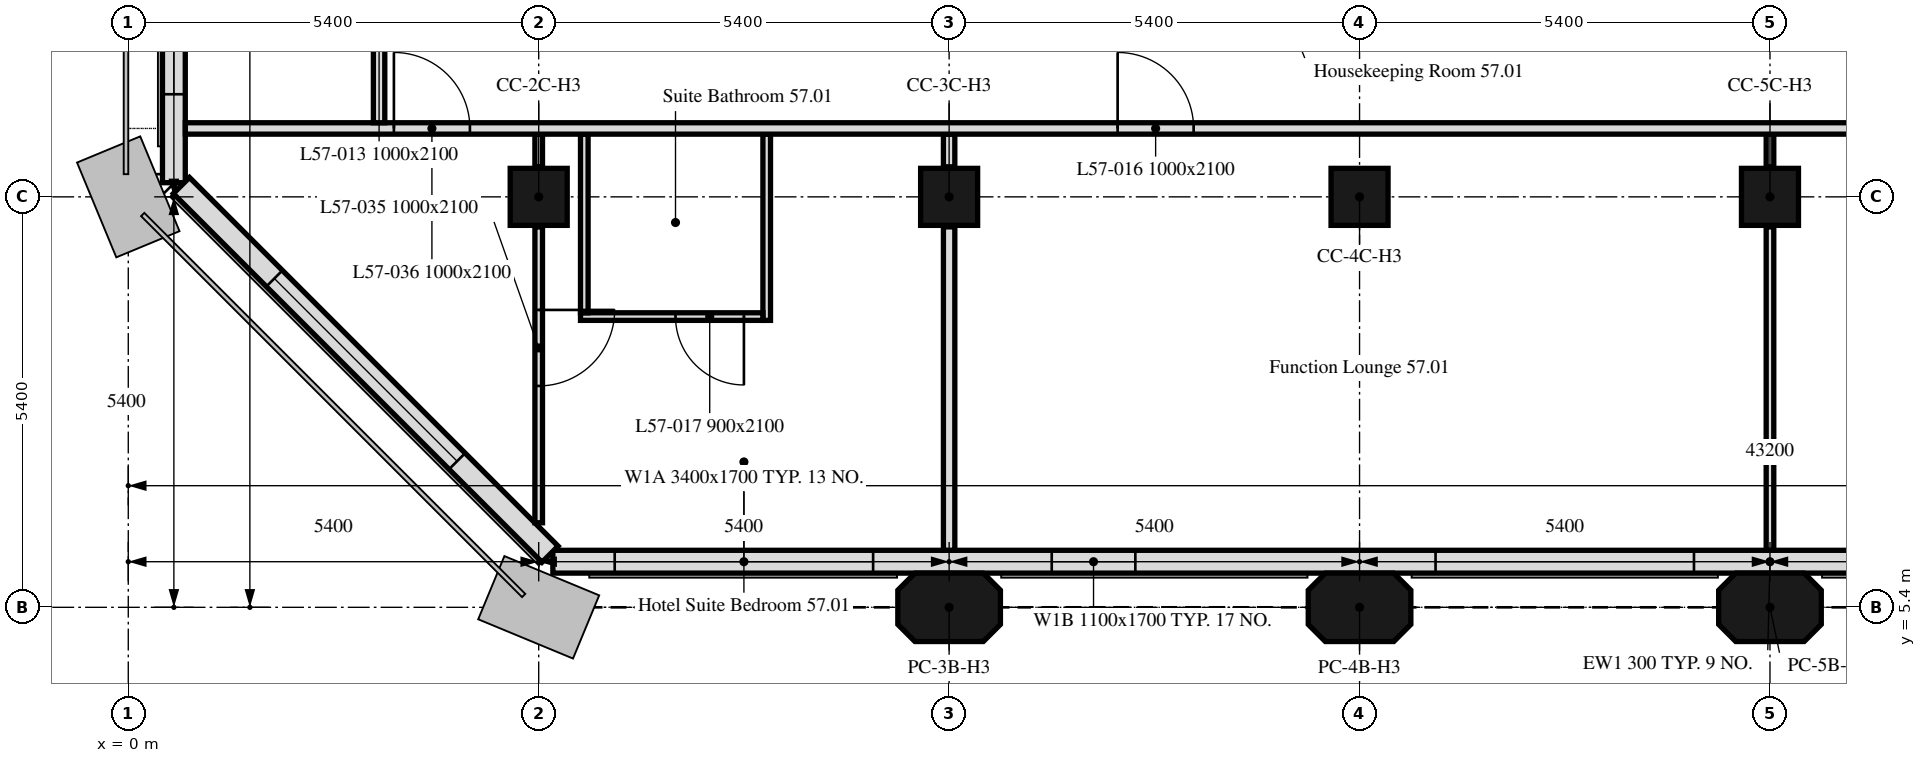
"""IFC4 building model, lengths in metres.
Left out: names, types, materials, properties, quantities, classifications, styles, units other than length and angle.
Written with IfcOpenShell. Run it as: python <this file> out.ifc"""

import sys

from ifc_helpers import new_model, si_unit, direction, frame, frame_2d, origin, origin_2d, place, context, subcontext, project, spatial, polyline, rectangle, outline, extrude, element, fill, save


model = new_model("IFC4")
c1 = context("Model", 3, precision=1e-05, world=origin(), true_north=direction((0.0, 1.0)))
c2 = subcontext(c1, "Body", "Model", "MODEL_VIEW")
j1 = project(units=[si_unit("LENGTHUNIT", "METRE"), si_unit("PLANEANGLEUNIT", "RADIAN")], contexts=[c1])
p1 = place(None, origin())
s1 = spatial("IfcSite", under=j1, at=p1, CompositionType="ELEMENT")
p2 = place(p1, origin())
s2 = spatial("IfcBuilding", under=s1, at=p2, CompositionType="ELEMENT")
p3 = place(p2, frame((0.0, 0.0, 226.9)))
s3 = spatial("IfcBuildingStorey", under=s2, at=p3, CompositionType="ELEMENT", Elevation=226.9)
for number, where, z_axis, x_axis in (
    (1, (10.8, 5.4, 0.0), (0.0, 0.0, 1.0), (1.0, 0.0, 0.0)),
    (2, (16.2, 5.4, 0.0), (0.0, 0.0, 1.0), (1.0, 0.0, 0.0)),
    (3, (21.6, 5.4, 0.0), (0.0, 0.0, 1.0), (1.0, 0.0, 0.0)),
):
    element("IfcColumn", number, at=place(p3, frame(where, z_axis=z_axis, x_axis=x_axis)), inside=s3, PredefinedType="COLUMN", context=c2, shape_type="SweptSolid", body=[
        extrude(outline(polyline([(-0.45, -0.45), (0.45, -0.45), (0.675, -0.225), (0.675, 0.225), (0.45, 0.45), (-0.45, 0.45), (-0.675, 0.225), (-0.675, -0.225), (-0.45, -0.45)])), origin(), (0.0, 0.0, 1.0), 3.0),
    ])
for number, where, z_axis, x_axis in (
    (4, (5.4, 10.8, 0.0), (0.0, 0.0, 1.0), (1.0, 0.0, 0.0)),
    (5, (10.8, 10.8, 0.0), (0.0, 0.0, 1.0), (1.0, 0.0, 0.0)),
    (6, (16.2, 10.8, 0.0), (0.0, 0.0, 1.0), (1.0, 0.0, 0.0)),
    (7, (21.6, 10.8, 0.0), (0.0, 0.0, 1.0), (1.0, 0.0, 0.0)),
):
    element("IfcColumn", number, at=place(p3, frame(where, z_axis=z_axis, x_axis=x_axis)), inside=s3, PredefinedType="COLUMN", context=c2, shape_type="SweptSolid", body=[
        extrude(rectangle(XDim=0.75, YDim=0.75, at=origin_2d()), origin(), (0.0, 0.0, 1.0), 3.0),
    ])
p4 = place(p3, frame((5.586, 6.0, 0.0), z_axis=(0.0, 0.0, 1.0), x_axis=(1.0, 0.0, 0.0)))
e8 = element("IfcWall", 8, at=p4, inside=s3, PredefinedType="SOLIDWALL", context=c2, shape_type="SweptSolid", body=[
    extrude(rectangle(XDim=32.027, YDim=0.3, at=frame_2d((16.014, 0.0))), origin(), (0.0, 0.0, 1.0), 3.0),
])
p5 = place(p4, frame((0.814, 0.0, 0.9)))
e9 = element("IfcOpeningElement", 9, at=p5, cuts=e8, PredefinedType="OPENING", context=c2, shape_type="SweptSolid", body=[
    extrude(rectangle(XDim=3.4, YDim=1.7, at=frame_2d((1.7, 0.85))), frame((0.0, 0.16, 0.0), z_axis=(0.0, -1.0, 0.0), x_axis=(1.0, 0.0, 0.0)), (0.0, 0.0, 1.0), 0.32),
])
p6 = place(p4, frame((6.564, 0.0, 0.9)))
e10 = element("IfcOpeningElement", 10, at=p6, cuts=e8, PredefinedType="OPENING", context=c2, shape_type="SweptSolid", body=[
    extrude(rectangle(XDim=1.1, YDim=1.7, at=frame_2d((0.55, 0.85))), frame((0.0, 0.16, 0.0), z_axis=(0.0, -1.0, 0.0), x_axis=(1.0, 0.0, 0.0)), (0.0, 0.0, 1.0), 0.32),
])
p7 = place(p4, frame((11.614, 0.0, 0.9)))
e11 = element("IfcOpeningElement", 11, at=p7, cuts=e8, PredefinedType="OPENING", context=c2, shape_type="SweptSolid", body=[
    extrude(rectangle(XDim=3.4, YDim=1.7, at=frame_2d((1.7, 0.85))), frame((0.0, 0.16, 0.0), z_axis=(0.0, -1.0, 0.0), x_axis=(1.0, 0.0, 0.0)), (0.0, 0.0, 1.0), 0.32),
])
p8 = place(p4, frame((17.364, 0.0, 0.9)))
e12 = element("IfcOpeningElement", 12, at=p8, cuts=e8, PredefinedType="OPENING", context=c2, shape_type="SweptSolid", body=[
    extrude(rectangle(XDim=1.1, YDim=1.7, at=frame_2d((0.55, 0.85))), frame((0.0, 0.16, 0.0), z_axis=(0.0, -1.0, 0.0), x_axis=(1.0, 0.0, 0.0)), (0.0, 0.0, 1.0), 0.32),
])
p9 = place(p4, frame((22.414, 0.0, 0.9)))
e13 = element("IfcOpeningElement", 13, at=p9, cuts=e8, PredefinedType="OPENING", context=c2, shape_type="SweptSolid", body=[
    extrude(rectangle(XDim=3.4, YDim=1.7, at=frame_2d((1.7, 0.85))), frame((0.0, 0.16, 0.0), z_axis=(0.0, -1.0, 0.0), x_axis=(1.0, 0.0, 0.0)), (0.0, 0.0, 1.0), 0.32),
])
p10 = place(p4, frame((28.164, 0.0, 0.9)))
e14 = element("IfcOpeningElement", 14, at=p10, cuts=e8, PredefinedType="OPENING", context=c2, shape_type="SweptSolid", body=[
    extrude(rectangle(XDim=1.1, YDim=1.7, at=frame_2d((0.55, 0.85))), frame((0.0, 0.16, 0.0), z_axis=(0.0, -1.0, 0.0), x_axis=(1.0, 0.0, 0.0)), (0.0, 0.0, 1.0), 0.32),
])
p11 = place(p3, frame((0.6, 43.014, 0.0), z_axis=(0.0, 0.0, 1.0), x_axis=(0.0, -1.0, 0.0)))
e15 = element("IfcWall", 15, at=p11, inside=s3, PredefinedType="SOLIDWALL", context=c2, shape_type="SweptSolid", body=[
    extrude(rectangle(XDim=32.027, YDim=0.3, at=frame_2d((16.014, 0.0))), origin(), (0.0, 0.0, 1.0), 3.0),
])
p12 = place(p11, frame((1.164, 0.0, 0.9)))
e16 = element("IfcOpeningElement", 16, at=p12, cuts=e15, PredefinedType="OPENING", context=c2, shape_type="SweptSolid", body=[
    extrude(rectangle(XDim=1.1, YDim=1.7, at=frame_2d((0.55, 0.85))), frame((0.0, 0.16, 0.0), z_axis=(0.0, -1.0, 0.0), x_axis=(1.0, 0.0, 0.0)), (0.0, 0.0, 1.0), 0.32),
])
p13 = place(p11, frame((2.589, 0.0, 0.9)))
e17 = element("IfcOpeningElement", 17, at=p13, cuts=e15, PredefinedType="OPENING", context=c2, shape_type="SweptSolid", body=[
    extrude(rectangle(XDim=0.65, YDim=1.7, at=frame_2d((0.325, 0.85))), frame((0.0, 0.16, 0.0), z_axis=(0.0, -1.0, 0.0), x_axis=(1.0, 0.0, 0.0)), (0.0, 0.0, 1.0), 0.32),
])
p14 = place(p11, frame((6.564, 0.0, 0.9)))
e18 = element("IfcOpeningElement", 18, at=p14, cuts=e15, PredefinedType="OPENING", context=c2, shape_type="SweptSolid", body=[
    extrude(rectangle(XDim=1.1, YDim=1.7, at=frame_2d((0.55, 0.85))), frame((0.0, 0.16, 0.0), z_axis=(0.0, -1.0, 0.0), x_axis=(1.0, 0.0, 0.0)), (0.0, 0.0, 1.0), 0.32),
])
p15 = place(p11, frame((8.164, 0.0, 0.9)))
e19 = element("IfcOpeningElement", 19, at=p15, cuts=e15, PredefinedType="OPENING", context=c2, shape_type="SweptSolid", body=[
    extrude(rectangle(XDim=1.1, YDim=1.7, at=frame_2d((0.55, 0.85))), frame((0.0, 0.16, 0.0), z_axis=(0.0, -1.0, 0.0), x_axis=(1.0, 0.0, 0.0)), (0.0, 0.0, 1.0), 0.32),
])
p16 = place(p11, frame((11.614, 0.0, 0.9)))
e20 = element("IfcOpeningElement", 20, at=p16, cuts=e15, PredefinedType="OPENING", context=c2, shape_type="SweptSolid", body=[
    extrude(rectangle(XDim=3.4, YDim=1.7, at=frame_2d((1.7, 0.85))), frame((0.0, 0.16, 0.0), z_axis=(0.0, -1.0, 0.0), x_axis=(1.0, 0.0, 0.0)), (0.0, 0.0, 1.0), 0.32),
])
p17 = place(p11, frame((17.364, 0.0, 0.9)))
e21 = element("IfcOpeningElement", 21, at=p17, cuts=e15, PredefinedType="OPENING", context=c2, shape_type="SweptSolid", body=[
    extrude(rectangle(XDim=1.1, YDim=1.7, at=frame_2d((0.55, 0.85))), frame((0.0, 0.16, 0.0), z_axis=(0.0, -1.0, 0.0), x_axis=(1.0, 0.0, 0.0)), (0.0, 0.0, 1.0), 0.32),
])
p18 = place(p11, frame((18.964, 0.0, 0.9)))
e22 = element("IfcOpeningElement", 22, at=p18, cuts=e15, PredefinedType="OPENING", context=c2, shape_type="SweptSolid", body=[
    extrude(rectangle(XDim=1.1, YDim=1.7, at=frame_2d((0.55, 0.85))), frame((0.0, 0.16, 0.0), z_axis=(0.0, -1.0, 0.0), x_axis=(1.0, 0.0, 0.0)), (0.0, 0.0, 1.0), 0.32),
])
p19 = place(p11, frame((22.414, 0.0, 0.9)))
e23 = element("IfcOpeningElement", 23, at=p19, cuts=e15, PredefinedType="OPENING", context=c2, shape_type="SweptSolid", body=[
    extrude(rectangle(XDim=3.4, YDim=1.7, at=frame_2d((1.7, 0.85))), frame((0.0, 0.16, 0.0), z_axis=(0.0, -1.0, 0.0), x_axis=(1.0, 0.0, 0.0)), (0.0, 0.0, 1.0), 0.32),
])
p20 = place(p11, frame((28.164, 0.0, 0.9)))
e24 = element("IfcOpeningElement", 24, at=p20, cuts=e15, PredefinedType="OPENING", context=c2, shape_type="SweptSolid", body=[
    extrude(rectangle(XDim=1.1, YDim=1.7, at=frame_2d((0.55, 0.85))), frame((0.0, 0.16, 0.0), z_axis=(0.0, -1.0, 0.0), x_axis=(1.0, 0.0, 0.0)), (0.0, 0.0, 1.0), 0.32),
])
p21 = place(p11, frame((29.764, 0.0, 0.9)))
e25 = element("IfcOpeningElement", 25, at=p21, cuts=e15, PredefinedType="OPENING", context=c2, shape_type="SweptSolid", body=[
    extrude(rectangle(XDim=1.1, YDim=1.7, at=frame_2d((0.55, 0.85))), frame((0.0, 0.16, 0.0), z_axis=(0.0, -1.0, 0.0), x_axis=(1.0, 0.0, 0.0)), (0.0, 0.0, 1.0), 0.32),
])
p22 = place(p3, frame((0.699, 10.949, 0.0), z_axis=(0.0, 0.0, 1.0), x_axis=(0.707106781187, -0.707106781187, 0.0)))
e26 = element("IfcWall", 26, at=p22, inside=s3, PredefinedType="SOLIDWALL", context=c2, shape_type="SweptSolid", body=[
    extrude(rectangle(XDim=6.86, YDim=0.3, at=frame_2d((3.43, 0.0))), origin(), (0.0, 0.0, 1.0), 3.0),
])
p23 = place(p22, frame((1.73, 0.0, 0.9)))
e27 = element("IfcOpeningElement", 27, at=p23, cuts=e26, PredefinedType="OPENING", context=c2, shape_type="SweptSolid", body=[
    extrude(rectangle(XDim=3.4, YDim=1.7, at=frame_2d((1.7, 0.85))), frame((0.0, 0.16, 0.0), z_axis=(0.0, -1.0, 0.0), x_axis=(1.0, 0.0, 0.0)), (0.0, 0.0, 1.0), 0.32),
])
p24 = place(p3, frame((21.6, 11.625, 0.0), z_axis=(0.0, 0.0, 1.0), x_axis=(0.0, -1.0, 0.0)))
e28 = element("IfcWall", 28, at=p24, inside=s3, PredefinedType="PARTITIONING", context=c2, shape_type="SweptSolid", body=[
    extrude(rectangle(XDim=0.43, YDim=0.1, at=frame_2d((0.215, 0.0))), origin(), (0.0, 0.0, 1.0), 3.0),
])
p25 = place(p3, frame((21.6, 10.405, 0.0), z_axis=(0.0, 0.0, 1.0), x_axis=(0.0, -1.0, 0.0)))
e29 = element("IfcWall", 29, at=p25, inside=s3, PredefinedType="PARTITIONING", context=c2, shape_type="SweptSolid", body=[
    extrude(rectangle(XDim=4.254, YDim=0.1, at=frame_2d((2.127, 0.0))), origin(), (0.0, 0.0, 1.0), 3.0),
])
p26 = place(p3, frame((10.8, 11.625, 0.0), z_axis=(0.0, 0.0, 1.0), x_axis=(0.0, -1.0, 0.0)))
e30 = element("IfcWall", 30, at=p26, inside=s3, PredefinedType="PARTITIONING", context=c2, shape_type="SweptSolid", body=[
    extrude(rectangle(XDim=0.43, YDim=0.15, at=frame_2d((0.215, 0.0))), origin(), (0.0, 0.0, 1.0), 3.0),
])
p27 = place(p3, frame((10.8, 10.405, 0.0), z_axis=(0.0, 0.0, 1.0), x_axis=(0.0, -1.0, 0.0)))
e31 = element("IfcWall", 31, at=p27, inside=s3, PredefinedType="PARTITIONING", context=c2, shape_type="SweptSolid", body=[
    extrude(rectangle(XDim=4.254, YDim=0.15, at=frame_2d((2.127, 0.0))), origin(), (0.0, 0.0, 1.0), 3.0),
])
p28 = place(p3, frame((8.4, 11.625, 0.0), z_axis=(0.0, 0.0, 1.0), x_axis=(0.0, -1.0, 0.0)))
e32 = element("IfcWall", 32, at=p28, inside=s3, PredefinedType="PARTITIONING", context=c2, shape_type="SweptSolid", body=[
    extrude(rectangle(XDim=2.45, YDim=0.1, at=frame_2d((1.225, 0.0))), origin(), (0.0, 0.0, 1.0), 3.0),
])
p29 = place(p3, frame((8.35, 9.225, 0.0), z_axis=(0.0, 0.0, 1.0), x_axis=(-1.0, 0.0, 0.0)))
e33 = element("IfcWall", 33, at=p29, inside=s3, PredefinedType="PARTITIONING", context=c2, shape_type="SweptSolid", body=[
    extrude(rectangle(XDim=2.4, YDim=0.1, at=frame_2d((1.2, 0.0))), origin(), (0.0, 0.0, 1.0), 3.0),
])
p30 = place(p29, frame((0.25, 0.0, 0.0)))
e34 = element("IfcOpeningElement", 34, at=p30, cuts=e33, PredefinedType="OPENING", context=c2, shape_type="SweptSolid", body=[
    extrude(rectangle(XDim=0.9, YDim=2.1, at=frame_2d((0.45, 1.05))), frame((0.0, 0.05, 0.0), z_axis=(0.0, -1.0, 0.0), x_axis=(1.0, 0.0, 0.0)), (0.0, 0.0, 1.0), 0.1),
])
p31 = place(p3, frame((6.0, 9.275, 0.0), z_axis=(0.0, 0.0, 1.0), x_axis=(0.0, 1.0, 0.0)))
e35 = element("IfcWall", 35, at=p31, inside=s3, PredefinedType="PARTITIONING", context=c2, shape_type="SweptSolid", body=[
    extrude(rectangle(XDim=2.35, YDim=0.1, at=frame_2d((1.175, 0.0))), origin(), (0.0, 0.0, 1.0), 3.0),
])
p32 = place(p3, frame((5.4, 11.625, 0.0), z_axis=(0.0, 0.0, 1.0), x_axis=(0.0, -1.0, 0.0)))
e36 = element("IfcWall", 36, at=p32, inside=s3, PredefinedType="PARTITIONING", context=c2, shape_type="SweptSolid", body=[
    extrude(rectangle(XDim=0.43, YDim=0.1, at=frame_2d((0.215, 0.0))), origin(), (0.0, 0.0, 1.0), 3.0),
])
p33 = place(p3, frame((5.4, 10.405, 0.0), z_axis=(0.0, 0.0, 1.0), x_axis=(0.0, -1.0, 0.0)))
e37 = element("IfcWall", 37, at=p33, inside=s3, PredefinedType="PARTITIONING", context=c2, shape_type="SweptSolid", body=[
    extrude(rectangle(XDim=3.893, YDim=0.1, at=frame_2d((1.946, 0.0))), origin(), (0.0, 0.0, 1.0), 3.0),
])
p34 = place(p33, frame((1.093, 0.0, 0.0)))
e38 = element("IfcOpeningElement", 38, at=p34, cuts=e37, PredefinedType="OPENING", context=c2, shape_type="SweptSolid", body=[
    extrude(rectangle(XDim=1.0, YDim=2.1, at=frame_2d((0.5, 1.05))), frame((0.0, 0.05, 0.0), z_axis=(0.0, -1.0, 0.0), x_axis=(1.0, 0.0, 0.0)), (0.0, 0.0, 1.0), 0.1),
])
p35 = place(p3, frame((0.751, 11.7, 0.0), z_axis=(0.0, 0.0, 1.0), x_axis=(1.0, 0.0, 0.0)))
e39 = element("IfcWall", 39, at=p35, inside=s3, PredefinedType="PARTITIONING", context=c2, shape_type="SweptSolid", body=[
    extrude(rectangle(XDim=41.698, YDim=0.15, at=frame_2d((20.849, 0.0))), origin(), (0.0, 0.0, 1.0), 3.0),
])
p36 = place(p35, frame((33.866, 0.0, 0.0)))
e40 = element("IfcOpeningElement", 40, at=p36, cuts=e39, PredefinedType="OPENING", context=c2, shape_type="SweptSolid", body=[
    extrude(rectangle(XDim=1.0, YDim=2.1, at=frame_2d((0.5, 1.05))), frame((0.0, 0.075, 0.0), z_axis=(0.0, -1.0, 0.0), x_axis=(1.0, 0.0, 0.0)), (0.0, 0.0, 1.0), 0.15),
])
p37 = place(p35, frame((28.432, 0.0, 0.0)))
e41 = element("IfcOpeningElement", 41, at=p37, cuts=e39, PredefinedType="OPENING", context=c2, shape_type="SweptSolid", body=[
    extrude(rectangle(XDim=1.0, YDim=2.1, at=frame_2d((0.5, 1.05))), frame((0.0, 0.075, 0.0), z_axis=(0.0, -1.0, 0.0), x_axis=(1.0, 0.0, 0.0)), (0.0, 0.0, 1.0), 0.15),
])
p38 = place(p35, frame((12.266, 0.0, 0.0)))
e42 = element("IfcOpeningElement", 42, at=p38, cuts=e39, PredefinedType="OPENING", context=c2, shape_type="SweptSolid", body=[
    extrude(rectangle(XDim=1.0, YDim=2.1, at=frame_2d((0.5, 1.05))), frame((0.0, 0.075, 0.0), z_axis=(0.0, -1.0, 0.0), x_axis=(1.0, 0.0, 0.0)), (0.0, 0.0, 1.0), 0.15),
])
p39 = place(p35, frame((2.744, 0.0, 0.0)))
e43 = element("IfcOpeningElement", 43, at=p39, cuts=e39, PredefinedType="OPENING", context=c2, shape_type="SweptSolid", body=[
    extrude(rectangle(XDim=1.0, YDim=2.1, at=frame_2d((0.5, 1.05))), frame((0.0, 0.075, 0.0), z_axis=(0.0, -1.0, 0.0), x_axis=(1.0, 0.0, 0.0)), (0.0, 0.0, 1.0), 0.15),
])
p40 = place(p3, frame((3.3, 11.775, 0.0), z_axis=(0.0, 0.0, 1.0), x_axis=(0.0, 1.0, 0.0)))
e44 = element("IfcWall", 44, at=p40, inside=s3, PredefinedType="PARTITIONING", context=c2, shape_type="SweptSolid", body=[
    extrude(rectangle(XDim=30.45, YDim=0.15, at=frame_2d((15.225, 0.0))), origin(), (0.0, 0.0, 1.0), 2.4),
])
p41 = place(p40, frame((17.425, 0.0, 0.0)))
e45 = element("IfcOpeningElement", 45, at=p41, cuts=e44, PredefinedType="OPENING", context=c2, shape_type="SweptSolid", body=[
    extrude(rectangle(XDim=1.0, YDim=2.1, at=frame_2d((0.5, 1.05))), frame((0.0, 0.075, 0.0), z_axis=(0.0, -1.0, 0.0), x_axis=(1.0, 0.0, 0.0)), (0.0, 0.0, 1.0), 0.15),
])
p42 = place(p40, frame((1.675, 0.0, 0.0)))
e46 = element("IfcOpeningElement", 46, at=p42, cuts=e44, PredefinedType="OPENING", context=c2, shape_type="SweptSolid", body=[
    extrude(rectangle(XDim=1.0, YDim=2.1, at=frame_2d((0.5, 1.05))), frame((0.0, 0.075, 0.0), z_axis=(0.0, -1.0, 0.0), x_axis=(1.0, 0.0, 0.0)), (0.0, 0.0, 1.0), 0.15),
])
p43 = place(p40, frame((9.325, 0.0, 0.0)))
e47 = element("IfcOpeningElement", 47, at=p43, cuts=e44, PredefinedType="OPENING", context=c2, shape_type="SweptSolid", body=[
    extrude(rectangle(XDim=1.0, YDim=2.1, at=frame_2d((0.5, 1.05))), frame((0.0, 0.075, 0.0), z_axis=(0.0, -1.0, 0.0), x_axis=(1.0, 0.0, 0.0)), (0.0, 0.0, 1.0), 0.15),
])
p44 = place(p40, frame((23.258, 0.0, 0.0)))
e48 = element("IfcOpeningElement", 48, at=p44, cuts=e44, PredefinedType="OPENING", context=c2, shape_type="SweptSolid", body=[
    extrude(rectangle(XDim=1.0, YDim=2.1, at=frame_2d((0.5, 1.05))), frame((0.0, 0.075, 0.0), z_axis=(0.0, -1.0, 0.0), x_axis=(1.0, 0.0, 0.0)), (0.0, 0.0, 1.0), 0.15),
])
p45 = place(p5, origin())
e49 = element("IfcWindow", 49, at=p45, inside=s3, PartitioningType="SINGLE_PANEL", PredefinedType="WINDOW", context=c2, shape_type="SweptSolid", body=[
    extrude(rectangle(XDim=3.4, YDim=1.7, at=frame_2d((1.7, 0.85))), frame((0.0, 0.03, 0.0), z_axis=(0.0, -1.0, 0.0), x_axis=(1.0, 0.0, 0.0)), (0.0, 0.0, 1.0), 0.06),
])
fill(e9, e49)
p46 = place(p6, origin())
e50 = element("IfcWindow", 50, at=p46, inside=s3, PartitioningType="SINGLE_PANEL", PredefinedType="WINDOW", context=c2, shape_type="SweptSolid", body=[
    extrude(rectangle(XDim=1.1, YDim=1.7, at=frame_2d((0.55, 0.85))), frame((0.0, 0.03, 0.0), z_axis=(0.0, -1.0, 0.0), x_axis=(1.0, 0.0, 0.0)), (0.0, 0.0, 1.0), 0.06),
])
fill(e10, e50)
p47 = place(p7, origin())
e51 = element("IfcWindow", 51, at=p47, inside=s3, PartitioningType="SINGLE_PANEL", PredefinedType="WINDOW", context=c2, shape_type="SweptSolid", body=[
    extrude(rectangle(XDim=3.4, YDim=1.7, at=frame_2d((1.7, 0.85))), frame((0.0, 0.03, 0.0), z_axis=(0.0, -1.0, 0.0), x_axis=(1.0, 0.0, 0.0)), (0.0, 0.0, 1.0), 0.06),
])
fill(e11, e51)
p48 = place(p21, origin())
e52 = element("IfcWindow", 52, at=p48, inside=s3, PartitioningType="SINGLE_PANEL", PredefinedType="WINDOW", context=c2, shape_type="SweptSolid", body=[
    extrude(rectangle(XDim=1.1, YDim=1.7, at=frame_2d((0.55, 0.85))), frame((0.0, 0.03, 0.0), z_axis=(0.0, -1.0, 0.0), x_axis=(1.0, 0.0, 0.0)), (0.0, 0.0, 1.0), 0.06),
])
fill(e25, e52)
p49 = place(p23, origin())
e53 = element("IfcWindow", 53, at=p49, inside=s3, PartitioningType="SINGLE_PANEL", PredefinedType="WINDOW", context=c2, shape_type="SweptSolid", body=[
    extrude(rectangle(XDim=3.4, YDim=1.7, at=frame_2d((1.7, 0.85))), frame((0.0, 0.03, 0.0), z_axis=(0.0, -1.0, 0.0), x_axis=(1.0, 0.0, 0.0)), (0.0, 0.0, 1.0), 0.06),
])
fill(e27, e53)
p50 = place(p38, origin())
e54 = element("IfcDoor", 54, at=p50, inside=s3, OperationType="SINGLE_SWING_LEFT", PredefinedType="DOOR", context=c2, shape_type="SweptSolid", body=[
    extrude(rectangle(XDim=1.0, YDim=2.1, at=frame_2d((0.5, 1.05))), frame((0.0, 0.025, 0.0), z_axis=(0.0, -1.0, 0.0), x_axis=(1.0, 0.0, 0.0)), (0.0, 0.0, 1.0), 0.05),
])
fill(e42, e54)
p51 = place(p30, origin())
e55 = element("IfcDoor", 55, at=p51, inside=s3, OperationType="SINGLE_SWING_RIGHT", PredefinedType="DOOR", context=c2, shape_type="SweptSolid", body=[
    extrude(rectangle(XDim=0.9, YDim=2.1, at=frame_2d((0.45, 1.05))), frame((0.0, 0.025, 0.0), z_axis=(0.0, -1.0, 0.0), x_axis=(1.0, 0.0, 0.0)), (0.0, 0.0, 1.0), 0.05),
])
fill(e34, e55)
p52 = place(p34, origin())
e56 = element("IfcDoor", 56, at=p52, inside=s3, OperationType="SINGLE_SWING_RIGHT", PredefinedType="DOOR", context=c2, shape_type="SweptSolid", body=[
    extrude(rectangle(XDim=1.0, YDim=2.1, at=frame_2d((0.5, 1.05))), frame((0.0, 0.025, 0.0), z_axis=(0.0, -1.0, 0.0), x_axis=(1.0, 0.0, 0.0)), (0.0, 0.0, 1.0), 0.05),
])
fill(e38, e56)
p53 = place(p39, origin())
e57 = element("IfcDoor", 57, at=p53, inside=s3, OperationType="SINGLE_SWING_RIGHT", PredefinedType="DOOR", context=c2, shape_type="SweptSolid", body=[
    extrude(rectangle(XDim=1.0, YDim=2.1, at=frame_2d((0.5, 1.05))), frame((0.0, 0.025, 0.0), z_axis=(0.0, -1.0, 0.0), x_axis=(1.0, 0.0, 0.0)), (0.0, 0.0, 1.0), 0.05),
])
fill(e43, e57)
save(model, sys.argv[1])
